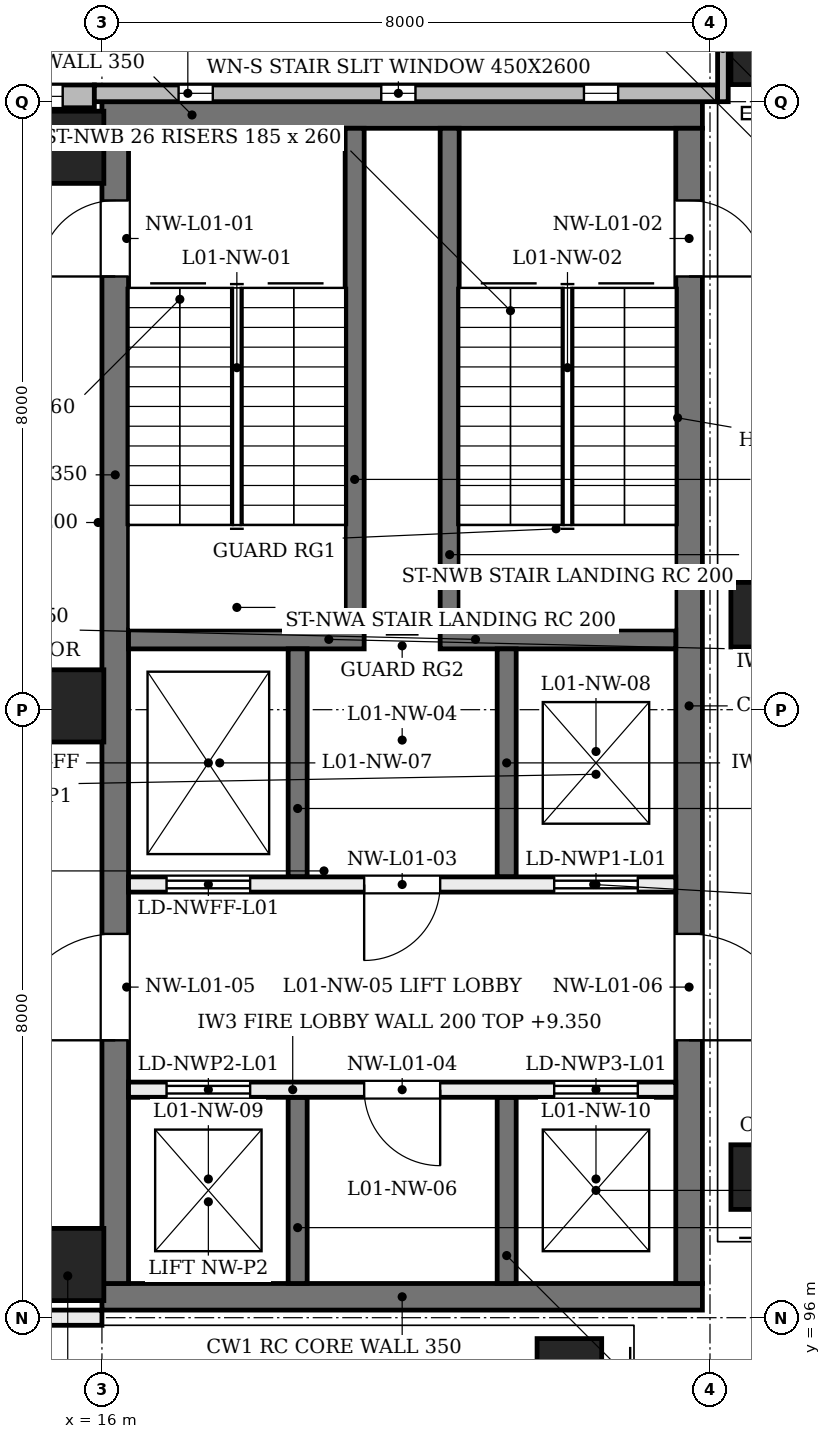
"""IFC4 building model, lengths in metres.
Left out: names, types, materials, properties, quantities, classifications, styles, units other than length and angle.
Written with IfcOpenShell. Run it as: python <this file> out.ifc"""

import sys

from ifc_helpers import new_model, si_unit, direction, frame, frame_2d, origin, origin_2d, place, context, subcontext, project, spatial, rectangle, extrude, element, fill, save


model = new_model("IFC4")
c1 = context("Model", 3, precision=1e-05, world=origin(), true_north=direction((0.0, 1.0)))
c2 = subcontext(c1, "Body", "Model", "MODEL_VIEW")
j1 = project(units=[si_unit("LENGTHUNIT", "METRE"), si_unit("PLANEANGLEUNIT", "RADIAN")], contexts=[c1])
p1 = place(None, origin())
s1 = spatial("IfcSite", under=j1, at=p1, CompositionType="ELEMENT")
p2 = place(p1, origin())
s2 = spatial("IfcBuilding", under=s1, at=p2, CompositionType="ELEMENT")
p3 = place(p2, frame((0.0, 0.0, 4.8)))
s3 = spatial("IfcBuildingStorey", under=s2, at=p3, CompositionType="ELEMENT", Elevation=4.8)
for number, where, z_axis, x_axis in (
    (1, (16.0, 96.275, 0.0), (0.0, 0.0, 1.0), (1.0, 0.0, 0.0)),
    (2, (16.0, 111.825, 0.0), (0.0, 0.0, 1.0), (1.0, 0.0, 0.0)),
):
    element("IfcWall", number, at=place(p3, frame(where, z_axis=z_axis, x_axis=x_axis)), inside=s3, PredefinedType="SHEAR", context=c2, shape_type="SweptSolid", body=[
        extrude(rectangle(XDim=7.9, YDim=0.35, at=frame_2d((3.95, 0.0))), origin(), (0.0, 0.0, 1.0), 4.58),
    ])
p4 = place(p3, frame((16.175, 96.45, 0.0), z_axis=(0.0, 0.0, 1.0), x_axis=(0.0, 1.0, 0.0)))
e3 = element("IfcWall", 3, at=p4, inside=s3, PredefinedType="SHEAR", context=c2, shape_type="SweptSolid", body=[
    extrude(rectangle(XDim=15.2, YDim=0.35, at=frame_2d((7.6, 0.0))), origin(), (0.0, 0.0, 1.0), 4.58),
])
p5 = place(p4, frame((13.25, 0.0, 0.0)))
e4 = element("IfcOpeningElement", 4, at=p5, cuts=e3, PredefinedType="OPENING", context=c2, shape_type="SweptSolid", body=[
    extrude(rectangle(XDim=1.0, YDim=2.1, at=frame_2d((0.5, 1.05))), frame((0.0, 0.185, 0.0), z_axis=(0.0, -1.0, 0.0), x_axis=(1.0, 0.0, 0.0)), (0.0, 0.0, 1.0), 0.37),
])
p6 = place(p4, frame((3.2, 0.0, 0.0)))
e5 = element("IfcOpeningElement", 5, at=p6, cuts=e3, PredefinedType="OPENING", context=c2, shape_type="SweptSolid", body=[
    extrude(rectangle(XDim=1.4, YDim=2.1, at=frame_2d((0.7, 1.05))), frame((0.0, 0.185, 0.0), z_axis=(0.0, -1.0, 0.0), x_axis=(1.0, 0.0, 0.0)), (0.0, 0.0, 1.0), 0.37),
])
p7 = place(p3, frame((23.725, 96.45, 0.0), z_axis=(0.0, 0.0, 1.0), x_axis=(0.0, 1.0, 0.0)))
e6 = element("IfcWall", 6, at=p7, inside=s3, PredefinedType="SHEAR", context=c2, shape_type="SweptSolid", body=[
    extrude(rectangle(XDim=15.2, YDim=0.35, at=frame_2d((7.6, 0.0))), origin(), (0.0, 0.0, 1.0), 4.58),
])
p8 = place(p7, frame((13.25, 0.0, 0.0)))
e7 = element("IfcOpeningElement", 7, at=p8, cuts=e6, PredefinedType="OPENING", context=c2, shape_type="SweptSolid", body=[
    extrude(rectangle(XDim=1.0, YDim=2.1, at=frame_2d((0.5, 1.05))), frame((0.0, 0.185, 0.0), z_axis=(0.0, -1.0, 0.0), x_axis=(1.0, 0.0, 0.0)), (0.0, 0.0, 1.0), 0.37),
])
p9 = place(p7, frame((3.2, 0.0, 0.0)))
e8 = element("IfcOpeningElement", 8, at=p9, cuts=e6, PredefinedType="OPENING", context=c2, shape_type="SweptSolid", body=[
    extrude(rectangle(XDim=1.4, YDim=2.1, at=frame_2d((0.7, 1.05))), frame((0.0, 0.185, 0.0), z_axis=(0.0, -1.0, 0.0), x_axis=(1.0, 0.0, 0.0)), (0.0, 0.0, 1.0), 0.37),
])
for number, where, z_axis, x_axis in (
    (9, (15.55, 96.7, 0.0), (0.0, 0.0, 1.0), (1.0, 0.0, 0.0)),
    (10, (15.55, 104.05, 0.0), (0.0, 0.0, 1.0), (1.0, 0.0, 0.0)),
    (11, (15.55, 111.4, 0.0), (0.0, 0.0, 1.0), (1.0, 0.0, 0.0)),
):
    element("IfcColumn", number, at=place(p3, frame(where, z_axis=z_axis, x_axis=x_axis)), inside=s3, PredefinedType="COLUMN", context=c2, shape_type="SweptSolid", body=[
        extrude(rectangle(XDim=0.95, YDim=0.95, at=origin_2d()), origin(), (0.0, 0.0, 1.0), 4.8),
    ])
for number, where, z_axis, x_axis in (
    (12, (24.7, 97.6, 0.0), (0.0, 0.204, 0.979), (-1.0, 0.0, 0.0)),
    (13, (24.7, 105.0, 0.0), (0.0, 0.204, 0.979), (-1.0, 0.0, 0.0)),
    (14, (24.7, 112.4, 0.0), (0.0, 0.204, 0.979), (-1.0, 0.0, 0.0)),
    (15, (15.0, 95.3, 0.0), (-0.204, 0.0, 0.979), (0.0, -1.0, 0.0)),
    (16, (22.4, 95.3, 0.0), (-0.204, 0.0, 0.979), (0.0, -1.0, 0.0)),
):
    element("IfcColumn", number, at=place(p3, frame(where, z_axis=z_axis, x_axis=x_axis)), inside=s3, PredefinedType="COLUMN", context=c2, shape_type="SweptSolid", body=[
        extrude(rectangle(XDim=0.85, YDim=0.85, at=origin_2d()), origin(), (0.0, 0.0, 1.0), 4.903),
    ])
p10 = place(p3, frame((8.0, 112.07, 0.0), z_axis=(0.0, 0.0, 1.0), x_axis=(1.0, 0.0, 0.0)))
e17 = element("IfcWall", 17, at=p10, inside=s3, PredefinedType="SOLIDWALL", context=c2, shape_type="SweptSolid", body=[
    extrude(rectangle(XDim=7.9, YDim=0.3, at=frame_2d((3.95, 0.0))), origin(), (0.0, 0.0, 1.0), 3.9),
])
p11 = place(p10, frame((0.417, 0.0, 0.75)))
e18 = element("IfcOpeningElement", 18, at=p11, cuts=e17, PredefinedType="OPENING", context=c2, shape_type="SweptSolid", body=[
    extrude(rectangle(XDim=1.8, YDim=3.1, at=frame_2d((0.9, 1.55))), frame((0.0, 0.16, 0.0), z_axis=(0.0, -1.0, 0.0), x_axis=(1.0, 0.0, 0.0)), (0.0, 0.0, 1.0), 0.32),
])
p12 = place(p10, frame((3.05, 0.0, 0.75)))
e19 = element("IfcOpeningElement", 19, at=p12, cuts=e17, PredefinedType="OPENING", context=c2, shape_type="SweptSolid", body=[
    extrude(rectangle(XDim=1.8, YDim=3.1, at=frame_2d((0.9, 1.55))), frame((0.0, 0.16, 0.0), z_axis=(0.0, -1.0, 0.0), x_axis=(1.0, 0.0, 0.0)), (0.0, 0.0, 1.0), 0.32),
])
p13 = place(p10, frame((5.683, 0.0, 0.75)))
e20 = element("IfcOpeningElement", 20, at=p13, cuts=e17, PredefinedType="OPENING", context=c2, shape_type="SweptSolid", body=[
    extrude(rectangle(XDim=1.8, YDim=3.1, at=frame_2d((0.9, 1.55))), frame((0.0, 0.16, 0.0), z_axis=(0.0, -1.0, 0.0), x_axis=(1.0, 0.0, 0.0)), (0.0, 0.0, 1.0), 0.32),
])
p14 = place(p3, frame((15.9, 112.11, 0.0), z_axis=(0.0, 0.0, 1.0), x_axis=(1.0, 0.0, 0.0)))
e21 = element("IfcWall", 21, at=p14, inside=s3, PredefinedType="SOLIDWALL", context=c2, shape_type="SweptSolid", body=[
    extrude(rectangle(XDim=8.2, YDim=0.22, at=frame_2d((4.1, 0.0))), origin(), (0.0, 0.0, 1.0), 3.9),
])
p15 = place(p14, frame((1.108, 0.0, 0.9)))
e22 = element("IfcOpeningElement", 22, at=p15, cuts=e21, PredefinedType="OPENING", context=c2, shape_type="SweptSolid", body=[
    extrude(rectangle(XDim=0.45, YDim=2.6, at=frame_2d((0.225, 1.3))), frame((0.0, 0.12, 0.0), z_axis=(0.0, -1.0, 0.0), x_axis=(1.0, 0.0, 0.0)), (0.0, 0.0, 1.0), 0.24),
])
p16 = place(p14, frame((3.775, 0.0, 0.9)))
e23 = element("IfcOpeningElement", 23, at=p16, cuts=e21, PredefinedType="OPENING", context=c2, shape_type="SweptSolid", body=[
    extrude(rectangle(XDim=0.45, YDim=2.6, at=frame_2d((0.225, 1.3))), frame((0.0, 0.12, 0.0), z_axis=(0.0, -1.0, 0.0), x_axis=(1.0, 0.0, 0.0)), (0.0, 0.0, 1.0), 0.24),
])
p17 = place(p14, frame((6.442, 0.0, 0.9)))
e24 = element("IfcOpeningElement", 24, at=p17, cuts=e21, PredefinedType="OPENING", context=c2, shape_type="SweptSolid", body=[
    extrude(rectangle(XDim=0.45, YDim=2.6, at=frame_2d((0.225, 1.3))), frame((0.0, 0.12, 0.0), z_axis=(0.0, -1.0, 0.0), x_axis=(1.0, 0.0, 0.0)), (0.0, 0.0, 1.0), 0.24),
])
p18 = place(p3, frame((24.17, 112.0, 0.0), z_axis=(0.0, 0.0, 1.0), x_axis=(0.0, 1.0, 0.0)))
e25 = element("IfcWall", 25, at=p18, inside=s3, PredefinedType="SOLIDWALL", context=c2, shape_type="SweptSolid", body=[
    extrude(rectangle(XDim=1.0, YDim=0.14, at=frame_2d((0.5, 0.0))), origin(), (0.0, 0.0, 1.0), 3.9),
])
for number, where, z_axis, x_axis in (
    (26, (19.325, 111.65, 0.0), (0.0, 0.0, 1.0), (0.0, -1.0, 0.0)),
    (27, (20.575, 111.65, 0.0), (0.0, 0.0, 1.0), (0.0, -1.0, 0.0)),
):
    element("IfcWall", number, at=place(p3, frame(where, z_axis=z_axis, x_axis=x_axis)), inside=s3, PredefinedType="SOLIDWALL", context=c2, shape_type="SweptSolid", body=[
        extrude(rectangle(XDim=6.6, YDim=0.25, at=frame_2d((3.3, 0.0))), origin(), (0.0, 0.0, 1.0), 4.55),
    ])
p19 = place(p3, frame((16.35, 104.925, 0.0), z_axis=(0.0, 0.0, 1.0), x_axis=(1.0, 0.0, 0.0)))
e28 = element("IfcWall", 28, at=p19, inside=s3, PredefinedType="SOLIDWALL", context=c2, shape_type="SweptSolid", body=[
    extrude(rectangle(XDim=3.1, YDim=0.25, at=frame_2d((1.55, 0.0))), origin(), (0.0, 0.0, 1.0), 4.55),
])
p20 = place(p3, frame((20.45, 104.925, 0.0), z_axis=(0.0, 0.0, 1.0), x_axis=(1.0, 0.0, 0.0)))
e29 = element("IfcWall", 29, at=p20, inside=s3, PredefinedType="SOLIDWALL", context=c2, shape_type="SweptSolid", body=[
    extrude(rectangle(XDim=3.1, YDim=0.25, at=frame_2d((1.55, 0.0))), origin(), (0.0, 0.0, 1.0), 4.55),
])
p21 = place(p3, frame((18.575, 104.8, 0.0), z_axis=(0.0, 0.0, 1.0), x_axis=(0.0, -1.0, 0.0)))
e30 = element("IfcWall", 30, at=p21, inside=s3, PredefinedType="SOLIDWALL", context=c2, shape_type="SweptSolid", body=[
    extrude(rectangle(XDim=3.0, YDim=0.25, at=frame_2d((1.5, 0.0))), origin(), (0.0, 0.0, 1.0), 4.55),
])
p22 = place(p3, frame((18.575, 98.9, 0.0), z_axis=(0.0, 0.0, 1.0), x_axis=(0.0, -1.0, 0.0)))
e31 = element("IfcWall", 31, at=p22, inside=s3, PredefinedType="SOLIDWALL", context=c2, shape_type="SweptSolid", body=[
    extrude(rectangle(XDim=2.45, YDim=0.25, at=frame_2d((1.225, 0.0))), origin(), (0.0, 0.0, 1.0), 4.55),
])
p23 = place(p3, frame((21.325, 104.8, 0.0), z_axis=(0.0, 0.0, 1.0), x_axis=(0.0, -1.0, 0.0)))
e32 = element("IfcWall", 32, at=p23, inside=s3, PredefinedType="SOLIDWALL", context=c2, shape_type="SweptSolid", body=[
    extrude(rectangle(XDim=3.0, YDim=0.25, at=frame_2d((1.5, 0.0))), origin(), (0.0, 0.0, 1.0), 4.55),
])
p24 = place(p3, frame((21.325, 98.9, 0.0), z_axis=(0.0, 0.0, 1.0), x_axis=(0.0, -1.0, 0.0)))
e33 = element("IfcWall", 33, at=p24, inside=s3, PredefinedType="SOLIDWALL", context=c2, shape_type="SweptSolid", body=[
    extrude(rectangle(XDim=2.45, YDim=0.25, at=frame_2d((1.225, 0.0))), origin(), (0.0, 0.0, 1.0), 4.55),
])
p25 = place(p3, frame((16.35, 101.7, 0.0), z_axis=(0.0, 0.0, 1.0), x_axis=(1.0, 0.0, 0.0)))
e34 = element("IfcWall", 34, at=p25, inside=s3, PredefinedType="SOLIDWALL", context=c2, shape_type="SweptSolid", body=[
    extrude(rectangle(XDim=7.2, YDim=0.2, at=frame_2d((3.6, 0.0))), origin(), (0.0, 0.0, 1.0), 4.55),
])
p26 = place(p25, frame((0.5, 0.0, 0.0)))
e35 = element("IfcOpeningElement", 35, at=p26, cuts=e34, PredefinedType="OPENING", context=c2, shape_type="SweptSolid", body=[
    extrude(rectangle(XDim=1.1, YDim=2.1, at=frame_2d((0.55, 1.05))), frame((0.0, 0.11, 0.0), z_axis=(0.0, -1.0, 0.0), x_axis=(1.0, 0.0, 0.0)), (0.0, 0.0, 1.0), 0.22),
])
p27 = place(p25, frame((5.6, 0.0, 0.0)))
e36 = element("IfcOpeningElement", 36, at=p27, cuts=e34, PredefinedType="OPENING", context=c2, shape_type="SweptSolid", body=[
    extrude(rectangle(XDim=1.1, YDim=2.1, at=frame_2d((0.55, 1.05))), frame((0.0, 0.11, 0.0), z_axis=(0.0, -1.0, 0.0), x_axis=(1.0, 0.0, 0.0)), (0.0, 0.0, 1.0), 0.22),
])
p28 = place(p25, frame((3.1, 0.0, 0.0)))
e37 = element("IfcOpeningElement", 37, at=p28, cuts=e34, PredefinedType="OPENING", context=c2, shape_type="SweptSolid", body=[
    extrude(rectangle(XDim=1.0, YDim=2.1, at=frame_2d((0.5, 1.05))), frame((0.0, 0.11, 0.0), z_axis=(0.0, -1.0, 0.0), x_axis=(1.0, 0.0, 0.0)), (0.0, 0.0, 1.0), 0.22),
])
p29 = place(p3, frame((16.35, 99.0, 0.0), z_axis=(0.0, 0.0, 1.0), x_axis=(1.0, 0.0, 0.0)))
e38 = element("IfcWall", 38, at=p29, inside=s3, PredefinedType="SOLIDWALL", context=c2, shape_type="SweptSolid", body=[
    extrude(rectangle(XDim=7.2, YDim=0.2, at=frame_2d((3.6, 0.0))), origin(), (0.0, 0.0, 1.0), 4.55),
])
p30 = place(p29, frame((0.5, 0.0, 0.0)))
e39 = element("IfcOpeningElement", 39, at=p30, cuts=e38, PredefinedType="OPENING", context=c2, shape_type="SweptSolid", body=[
    extrude(rectangle(XDim=1.1, YDim=2.1, at=frame_2d((0.55, 1.05))), frame((0.0, 0.11, 0.0), z_axis=(0.0, -1.0, 0.0), x_axis=(1.0, 0.0, 0.0)), (0.0, 0.0, 1.0), 0.22),
])
p31 = place(p29, frame((5.6, 0.0, 0.0)))
e40 = element("IfcOpeningElement", 40, at=p31, cuts=e38, PredefinedType="OPENING", context=c2, shape_type="SweptSolid", body=[
    extrude(rectangle(XDim=1.1, YDim=2.1, at=frame_2d((0.55, 1.05))), frame((0.0, 0.11, 0.0), z_axis=(0.0, -1.0, 0.0), x_axis=(1.0, 0.0, 0.0)), (0.0, 0.0, 1.0), 0.22),
])
p32 = place(p29, frame((3.1, 0.0, 0.0)))
e41 = element("IfcOpeningElement", 41, at=p32, cuts=e38, PredefinedType="OPENING", context=c2, shape_type="SweptSolid", body=[
    extrude(rectangle(XDim=1.0, YDim=2.1, at=frame_2d((0.5, 1.05))), frame((0.0, 0.11, 0.0), z_axis=(0.0, -1.0, 0.0), x_axis=(1.0, 0.0, 0.0)), (0.0, 0.0, 1.0), 0.22),
])
p33 = place(p3, frame((12.4, 96.0, 0.0), z_axis=(0.0, 0.0, 1.0), x_axis=(1.0, 0.0, 0.0)))
e42 = element("IfcWall", 42, at=p33, inside=s3, PredefinedType="PARTITIONING", context=c2, shape_type="SweptSolid", body=[
    extrude(rectangle(XDim=3.6, YDim=0.2, at=frame_2d((1.8, 0.0))), origin(), (0.0, 0.0, 1.0), 3.88),
])
p34 = place(p33, frame((0.05, 0.0, 0.0)))
e43 = element("IfcOpeningElement", 43, at=p34, cuts=e42, PredefinedType="OPENING", context=c2, shape_type="SweptSolid", body=[
    extrude(rectangle(XDim=1.0, YDim=2.1, at=frame_2d((0.5, 1.05))), frame((0.0, 0.11, 0.0), z_axis=(0.0, -1.0, 0.0), x_axis=(1.0, 0.0, 0.0)), (0.0, 0.0, 1.0), 0.22),
])
p35 = place(p13, origin())
e44 = element("IfcWindow", 44, at=p35, inside=s3, PartitioningType="SINGLE_PANEL", PredefinedType="WINDOW", context=c2, shape_type="SweptSolid", body=[
    extrude(rectangle(XDim=1.8, YDim=3.1, at=frame_2d((0.9, 1.55))), frame((0.0, 0.03, 0.0), z_axis=(0.0, -1.0, 0.0), x_axis=(1.0, 0.0, 0.0)), (0.0, 0.0, 1.0), 0.06),
])
fill(e20, e44)
p36 = place(p15, origin())
e45 = element("IfcWindow", 45, at=p36, inside=s3, PartitioningType="SINGLE_PANEL", PredefinedType="WINDOW", context=c2, shape_type="SweptSolid", body=[
    extrude(rectangle(XDim=0.45, YDim=2.6, at=frame_2d((0.225, 1.3))), frame((0.0, 0.03, 0.0), z_axis=(0.0, -1.0, 0.0), x_axis=(1.0, 0.0, 0.0)), (0.0, 0.0, 1.0), 0.06),
])
fill(e22, e45)
p37 = place(p16, origin())
e46 = element("IfcWindow", 46, at=p37, inside=s3, PartitioningType="SINGLE_PANEL", PredefinedType="WINDOW", context=c2, shape_type="SweptSolid", body=[
    extrude(rectangle(XDim=0.45, YDim=2.6, at=frame_2d((0.225, 1.3))), frame((0.0, 0.03, 0.0), z_axis=(0.0, -1.0, 0.0), x_axis=(1.0, 0.0, 0.0)), (0.0, 0.0, 1.0), 0.06),
])
fill(e23, e46)
p38 = place(p17, origin())
e47 = element("IfcWindow", 47, at=p38, inside=s3, PartitioningType="SINGLE_PANEL", PredefinedType="WINDOW", context=c2, shape_type="SweptSolid", body=[
    extrude(rectangle(XDim=0.45, YDim=2.6, at=frame_2d((0.225, 1.3))), frame((0.0, 0.03, 0.0), z_axis=(0.0, -1.0, 0.0), x_axis=(1.0, 0.0, 0.0)), (0.0, 0.0, 1.0), 0.06),
])
fill(e24, e47)
p39 = place(p5, origin())
e48 = element("IfcDoor", 48, at=p39, inside=s3, OperationType="SINGLE_SWING_LEFT", PredefinedType="DOOR", context=c2, shape_type="SweptSolid", body=[
    extrude(rectangle(XDim=1.0, YDim=2.1, at=frame_2d((0.5, 1.05))), frame((0.0, 0.025, 0.0), z_axis=(0.0, -1.0, 0.0), x_axis=(1.0, 0.0, 0.0)), (0.0, 0.0, 1.0), 0.05),
])
fill(e4, e48)
p40 = place(p8, frame((1.0, 0.0, 0.0), z_axis=(0.0, 0.0, 1.0), x_axis=(-1.0, 0.0, 0.0)))
e49 = element("IfcDoor", 49, at=p40, inside=s3, OperationType="SINGLE_SWING_LEFT", PredefinedType="DOOR", context=c2, shape_type="SweptSolid", body=[
    extrude(rectangle(XDim=1.0, YDim=2.1, at=frame_2d((0.5, 1.05))), frame((0.0, 0.025, 0.0), z_axis=(0.0, -1.0, 0.0), x_axis=(1.0, 0.0, 0.0)), (0.0, 0.0, 1.0), 0.05),
])
fill(e7, e49)
p41 = place(p26, frame((1.1, 0.0, 0.0), z_axis=(0.0, 0.0, 1.0), x_axis=(-1.0, 0.0, 0.0)))
e50 = element("IfcDoor", 50, at=p41, inside=s3, OperationType="DOUBLE_DOOR_SLIDING", PredefinedType="DOOR", context=c2, shape_type="SweptSolid", body=[
    extrude(rectangle(XDim=1.1, YDim=2.1, at=frame_2d((0.55, 1.05))), frame((0.0, 0.025, 0.0), z_axis=(0.0, -1.0, 0.0), x_axis=(1.0, 0.0, 0.0)), (0.0, 0.0, 1.0), 0.05),
])
fill(e35, e50)
p42 = place(p27, frame((1.1, 0.0, 0.0), z_axis=(0.0, 0.0, 1.0), x_axis=(-1.0, 0.0, 0.0)))
e51 = element("IfcDoor", 51, at=p42, inside=s3, OperationType="DOUBLE_DOOR_SLIDING", PredefinedType="DOOR", context=c2, shape_type="SweptSolid", body=[
    extrude(rectangle(XDim=1.1, YDim=2.1, at=frame_2d((0.55, 1.05))), frame((0.0, 0.025, 0.0), z_axis=(0.0, -1.0, 0.0), x_axis=(1.0, 0.0, 0.0)), (0.0, 0.0, 1.0), 0.05),
])
fill(e36, e51)
p43 = place(p30, origin())
e52 = element("IfcDoor", 52, at=p43, inside=s3, OperationType="DOUBLE_DOOR_SLIDING", PredefinedType="DOOR", context=c2, shape_type="SweptSolid", body=[
    extrude(rectangle(XDim=1.1, YDim=2.1, at=frame_2d((0.55, 1.05))), frame((0.0, 0.025, 0.0), z_axis=(0.0, -1.0, 0.0), x_axis=(1.0, 0.0, 0.0)), (0.0, 0.0, 1.0), 0.05),
])
fill(e39, e52)
p44 = place(p31, origin())
e53 = element("IfcDoor", 53, at=p44, inside=s3, OperationType="DOUBLE_DOOR_SLIDING", PredefinedType="DOOR", context=c2, shape_type="SweptSolid", body=[
    extrude(rectangle(XDim=1.1, YDim=2.1, at=frame_2d((0.55, 1.05))), frame((0.0, 0.025, 0.0), z_axis=(0.0, -1.0, 0.0), x_axis=(1.0, 0.0, 0.0)), (0.0, 0.0, 1.0), 0.05),
])
fill(e40, e53)
p45 = place(p28, frame((1.0, 0.0, 0.0), z_axis=(0.0, 0.0, 1.0), x_axis=(-1.0, 0.0, 0.0)))
e54 = element("IfcDoor", 54, at=p45, inside=s3, OperationType="SINGLE_SWING_LEFT", PredefinedType="DOOR", context=c2, shape_type="SweptSolid", body=[
    extrude(rectangle(XDim=1.0, YDim=2.1, at=frame_2d((0.5, 1.05))), frame((0.0, 0.025, 0.0), z_axis=(0.0, -1.0, 0.0), x_axis=(1.0, 0.0, 0.0)), (0.0, 0.0, 1.0), 0.05),
])
fill(e37, e54)
p46 = place(p32, origin())
e55 = element("IfcDoor", 55, at=p46, inside=s3, OperationType="SINGLE_SWING_RIGHT", PredefinedType="DOOR", context=c2, shape_type="SweptSolid", body=[
    extrude(rectangle(XDim=1.0, YDim=2.1, at=frame_2d((0.5, 1.05))), frame((0.0, 0.025, 0.0), z_axis=(0.0, -1.0, 0.0), x_axis=(1.0, 0.0, 0.0)), (0.0, 0.0, 1.0), 0.05),
])
fill(e41, e55)
p47 = place(p6, origin())
e56 = element("IfcDoor", 56, at=p47, inside=s3, OperationType="SINGLE_SWING_LEFT", PredefinedType="DOOR", context=c2, shape_type="SweptSolid", body=[
    extrude(rectangle(XDim=1.4, YDim=2.1, at=frame_2d((0.7, 1.05))), frame((0.0, 0.025, 0.0), z_axis=(0.0, -1.0, 0.0), x_axis=(1.0, 0.0, 0.0)), (0.0, 0.0, 1.0), 0.05),
])
fill(e5, e56)
p48 = place(p9, frame((1.4, 0.0, 0.0), z_axis=(0.0, 0.0, 1.0), x_axis=(-1.0, 0.0, 0.0)))
e57 = element("IfcDoor", 57, at=p48, inside=s3, OperationType="SINGLE_SWING_LEFT", PredefinedType="DOOR", context=c2, shape_type="SweptSolid", body=[
    extrude(rectangle(XDim=1.4, YDim=2.1, at=frame_2d((0.7, 1.05))), frame((0.0, 0.025, 0.0), z_axis=(0.0, -1.0, 0.0), x_axis=(1.0, 0.0, 0.0)), (0.0, 0.0, 1.0), 0.05),
])
fill(e8, e57)
save(model, sys.argv[1])
